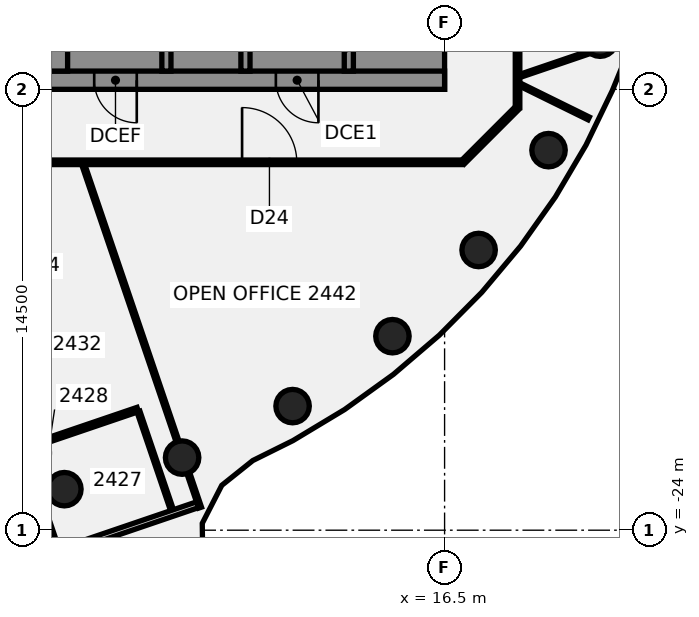
"""IFC4 building model, lengths in metres.
Left out: names, types, materials, properties, quantities, classifications, styles, units other than length and angle.
Written with IfcOpenShell. Run it as: python <this file> out.ifc"""

import sys

from ifc_helpers import new_model, si_unit, direction, frame, frame_2d, origin, origin_2d, place, context, subcontext, project, spatial, polyline, rectangle, circle, outline, extrude, element, fill, save


model = new_model("IFC4")
c1 = context("Model", 3, precision=1e-05, world=origin(), true_north=direction((0.0, 1.0)))
c2 = subcontext(c1, "Body", "Model", "MODEL_VIEW")
j1 = project(units=[si_unit("LENGTHUNIT", "METRE"), si_unit("PLANEANGLEUNIT", "RADIAN")], contexts=[c1])
p1 = place(None, origin())
s1 = spatial("IfcSite", under=j1, at=p1, CompositionType="ELEMENT")
p2 = place(p1, origin())
s2 = spatial("IfcBuilding", under=s1, at=p2, CompositionType="ELEMENT")
p3 = place(p2, frame((0.0, 0.0, 102.25)))
s3 = spatial("IfcBuildingStorey", under=s2, at=p3, CompositionType="ELEMENT", Elevation=102.25)
for number, where, z_axis, x_axis in (
    (1, (3.994, -22.651, -0.14), (0.0, 0.0, 1.0), (1.0, 0.0, 0.0)),
    (2, (7.866, -21.613, -0.14), (0.0, 0.0, 1.0), (1.0, 0.0, 0.0)),
    (3, (11.5, -19.919, -0.14), (0.0, 0.0, 1.0), (1.0, 0.0, 0.0)),
    (4, (14.784, -17.619, -0.14), (0.0, 0.0, 1.0), (1.0, 0.0, 0.0)),
    (5, (17.619, -14.784, -0.14), (0.0, 0.0, 1.0), (1.0, 0.0, 0.0)),
    (6, (19.919, -11.5, -0.14), (0.0, 0.0, 1.0), (1.0, 0.0, 0.0)),
    (7, (21.613, -7.866, -0.14), (0.0, 0.0, 1.0), (1.0, 0.0, 0.0)),
):
    element("IfcColumn", number, at=place(p3, frame(where, z_axis=z_axis, x_axis=x_axis)), inside=s3, PredefinedType="COLUMN", context=c2, shape_type="SweptSolid", body=[
        extrude(circle(Radius=0.55, at=origin_2d()), origin(), (0.0, 0.0, 1.0), 3.75),
    ])
p4 = place(p3, frame((1.594, -22.957, 0.0), z_axis=(0.0, 0.0, 1.0), x_axis=(0.322459995199, -0.946583092759, 0.0)))
e8 = element("IfcWall", 8, at=p4, inside=s3, PredefinedType="PARTITIONING", context=c2, shape_type="SweptSolid", body=[
    extrude(rectangle(XDim=15.801, YDim=0.15, at=frame_2d((7.9, 0.0))), origin(), (0.0, 0.0, 1.0), 3.01),
])
p5 = place(p4, frame((0.58, 0.0, 0.0)))
e9 = element("IfcOpeningElement", 9, at=p5, cuts=e8, PredefinedType="OPENING", context=c2, shape_type="SweptSolid", body=[
    extrude(rectangle(XDim=1.0, YDim=2.1, at=frame_2d((0.5, 1.05))), frame((0.0, 0.085, 0.0), z_axis=(0.0, -1.0, 0.0), x_axis=(1.0, 0.0, 0.0)), (0.0, 0.0, 1.0), 0.17),
])
p6 = place(p4, frame((12.131, 0.0, 0.0)))
e10 = element("IfcOpeningElement", 10, at=p6, cuts=e8, PredefinedType="OPENING", context=c2, shape_type="SweptSolid", body=[
    extrude(rectangle(XDim=0.9, YDim=2.1, at=frame_2d((0.45, 1.05))), frame((0.0, 0.085, 0.0), z_axis=(0.0, -1.0, 0.0), x_axis=(1.0, 0.0, 0.0)), (0.0, 0.0, 1.0), 0.17),
])
p7 = place(p4, frame((3.28, 0.0, 0.0)))
e11 = element("IfcOpeningElement", 11, at=p7, cuts=e8, PredefinedType="OPENING", context=c2, shape_type="SweptSolid", body=[
    extrude(rectangle(XDim=1.8, YDim=2.1, at=frame_2d((0.9, 1.05))), frame((0.0, 0.085, 0.0), z_axis=(0.0, -1.0, 0.0), x_axis=(1.0, 0.0, 0.0)), (0.0, 0.0, 1.0), 0.17),
])
p8 = place(p3, frame((2.646, -21.395, 0.0), z_axis=(0.0, 0.0, 1.0), x_axis=(0.322461421238, -0.946582606967, 0.0)))
e12 = element("IfcWall", 12, at=p8, inside=s3, PredefinedType="PARTITIONING", context=c2, shape_type="SweptSolid", body=[
    extrude(rectangle(XDim=3.415, YDim=0.15, at=frame_2d((1.708, 0.0))), origin(), (0.0, 0.0, 1.0), 3.01),
])
p9 = place(p8, frame((0.07, 0.0, 0.0)))
e13 = element("IfcOpeningElement", 13, at=p9, cuts=e12, PredefinedType="OPENING", context=c2, shape_type="SweptSolid", body=[
    extrude(rectangle(XDim=0.9, YDim=2.1, at=frame_2d((0.45, 1.05))), frame((0.0, 0.085, 0.0), z_axis=(0.0, -1.0, 0.0), x_axis=(1.0, 0.0, 0.0)), (0.0, 0.0, 1.0), 0.17),
])
p10 = place(p3, frame((4.615, -11.976, 0.0), z_axis=(0.0, 0.0, 1.0), x_axis=(0.322350798931, -0.946620284184, 0.0)))
e14 = element("IfcWall", 14, at=p10, inside=s3, PredefinedType="PARTITIONING", context=c2, shape_type="SweptSolid", body=[
    extrude(rectangle(XDim=9.631, YDim=0.1, at=frame_2d((4.815, 0.0))), origin(), (0.0, 0.0, 1.0), 3.01),
])
p11 = place(p3, frame((8.069, -22.119, 0.0), z_axis=(0.0, 0.0, 1.0), x_axis=(0.322430157515, -0.946593256644, 0.0)))
e15 = element("IfcWall", 15, at=p11, inside=s3, PredefinedType="PARTITIONING", context=c2, shape_type="SweptSolid", body=[
    extrude(rectangle(XDim=1.203, YDim=0.1, at=frame_2d((0.602, 0.0))), origin(), (0.0, 0.0, 1.0), 3.01),
])
p12 = place(p3, frame((6.431, -20.1, 0.0), z_axis=(0.0, 0.0, 1.0), x_axis=(0.322273311912, -0.946646667152, 0.0)))
e16 = element("IfcWall", 16, at=p12, inside=s3, PredefinedType="PARTITIONING", context=c2, shape_type="SweptSolid", body=[
    extrude(rectangle(XDim=3.425, YDim=0.1, at=frame_2d((1.712, 0.0))), origin(), (0.0, 0.0, 1.0), 3.01),
])
p13 = place(p3, frame((18.978, -9.343, 0.0), z_axis=(0.0, 0.0, 1.0), x_axis=(0.897216700268, -0.441590526122, 0.0)))
e17 = element("IfcWall", 17, at=p13, inside=s3, PredefinedType="PARTITIONING", context=c2, shape_type="SweptSolid", body=[
    extrude(rectangle(XDim=2.522, YDim=0.1, at=frame_2d((1.261, 0.0))), origin(), (0.0, 0.0, 1.0), 3.01),
])
p14 = place(p3, frame((-17.1, -11.9, 0.0), z_axis=(0.0, 0.0, 1.0), x_axis=(1.0, 0.0, 0.0)))
e18 = element("IfcWall", 18, at=p14, inside=s3, PredefinedType="PARTITIONING", context=c2, shape_type="SweptSolid", body=[
    extrude(rectangle(XDim=34.165, YDim=0.15, at=frame_2d((17.083, 0.0))), origin(), (0.0, 0.0, 1.0), 3.01),
])
p15 = place(p14, frame((12.769, 0.0, 0.0)))
e19 = element("IfcOpeningElement", 19, at=p15, cuts=e18, PredefinedType="OPENING", context=c2, shape_type="SweptSolid", body=[
    extrude(rectangle(XDim=1.8, YDim=2.1, at=frame_2d((0.9, 1.05))), frame((0.0, 0.085, 0.0), z_axis=(0.0, -1.0, 0.0), x_axis=(1.0, 0.0, 0.0)), (0.0, 0.0, 1.0), 0.17),
])
p16 = place(p14, frame((2.55, 0.0, 0.0)))
e20 = element("IfcOpeningElement", 20, at=p16, cuts=e18, PredefinedType="OPENING", context=c2, shape_type="SweptSolid", body=[
    extrude(rectangle(XDim=1.8, YDim=2.1, at=frame_2d((0.9, 1.05))), frame((0.0, 0.085, 0.0), z_axis=(0.0, -1.0, 0.0), x_axis=(1.0, 0.0, 0.0)), (0.0, 0.0, 1.0), 0.17),
])
p17 = place(p14, frame((26.939, 0.0, 0.0)))
e21 = element("IfcOpeningElement", 21, at=p17, cuts=e18, PredefinedType="OPENING", context=c2, shape_type="SweptSolid", body=[
    extrude(rectangle(XDim=1.8, YDim=2.1, at=frame_2d((0.9, 1.05))), frame((0.0, 0.085, 0.0), z_axis=(0.0, -1.0, 0.0), x_axis=(1.0, 0.0, 0.0)), (0.0, 0.0, 1.0), 0.17),
])
p18 = place(p3, frame((2.62, -21.32, 0.0), z_axis=(0.0, 0.0, 1.0), x_axis=(0.946650302142, 0.322262634282, 0.0)))
e22 = element("IfcWall", 22, at=p18, inside=s3, PredefinedType="PARTITIONING", context=c2, shape_type="SweptSolid", body=[
    extrude(rectangle(XDim=4.001, YDim=0.15, at=frame_2d((2.0, 0.0))), origin(), (0.0, 0.0, 1.0), 3.01),
])
p19 = place(p3, frame((-5.116, -27.757, 0.0), z_axis=(0.0, 0.0, 1.0), x_axis=(0.946603630107, 0.32239970141, 0.0)))
e23 = element("IfcWall", 23, at=p19, inside=s3, PredefinedType="PARTITIONING", context=c2, shape_type="SweptSolid", body=[
    extrude(rectangle(XDim=14.249, YDim=0.2, at=frame_2d((7.124, 0.0))), origin(), (0.0, 0.0, 1.0), 3.01),
])
p20 = place(p19, frame((5.799, 0.0, 0.0)))
e24 = element("IfcOpeningElement", 24, at=p20, cuts=e23, PredefinedType="OPENING", context=c2, shape_type="SweptSolid", body=[
    extrude(rectangle(XDim=1.4, YDim=2.1, at=frame_2d((0.7, 1.05))), frame((0.0, 0.11, 0.0), z_axis=(0.0, -1.0, 0.0), x_axis=(1.0, 0.0, 0.0)), (0.0, 0.0, 1.0), 0.22),
])
p21 = place(p3, frame((18.976, -9.058, 0.0), z_axis=(0.0, 0.0, 1.0), x_axis=(0.946631529525, 0.322317773804, 0.0)))
e25 = element("IfcWall", 25, at=p21, inside=s3, PredefinedType="PARTITIONING", context=c2, shape_type="SweptSolid", body=[
    extrude(rectangle(XDim=2.415, YDim=0.1, at=frame_2d((1.208, 0.0))), origin(), (0.0, 0.0, 1.0), 3.01),
])
p22 = place(p3, frame((17.1, -11.9, 0.0), z_axis=(0.0, 0.0, 1.0), x_axis=(0.707106781187, 0.707106781187, 0.0)))
e26 = element("IfcWall", 26, at=p22, inside=s3, PredefinedType="PARTITIONING", context=c2, shape_type="SweptSolid", body=[
    extrude(rectangle(XDim=2.505, YDim=0.15, at=frame_2d((1.253, 0.0))), origin(), (0.0, 0.0, 1.0), 3.01),
])
p23 = place(p3, frame((18.9, -10.1, 0.0), z_axis=(0.0, 0.0, 1.0), x_axis=(0.0, 1.0, 0.0)))
e27 = element("IfcWall", 27, at=p23, inside=s3, PredefinedType="PARTITIONING", context=c2, shape_type="SweptSolid", body=[
    extrude(rectangle(XDim=20.2, YDim=0.15, at=frame_2d((10.1, 0.0))), origin(), (0.0, 0.0, 1.0), 3.01),
])
p24 = place(p23, frame((8.903, 0.0, 0.0)))
e28 = element("IfcOpeningElement", 28, at=p24, cuts=e27, PredefinedType="OPENING", context=c2, shape_type="SweptSolid", body=[
    extrude(rectangle(XDim=1.8, YDim=2.1, at=frame_2d((0.9, 1.05))), frame((0.0, 0.085, 0.0), z_axis=(0.0, -1.0, 0.0), x_axis=(1.0, 0.0, 0.0)), (0.0, 0.0, 1.0), 0.17),
])
p25 = place(p23, frame((13.836, 0.0, 0.0)))
e29 = element("IfcOpeningElement", 29, at=p25, cuts=e27, PredefinedType="OPENING", context=c2, shape_type="SweptSolid", body=[
    extrude(rectangle(XDim=0.9, YDim=2.1, at=frame_2d((0.45, 1.05))), frame((0.0, 0.085, 0.0), z_axis=(0.0, -1.0, 0.0), x_axis=(1.0, 0.0, 0.0)), (0.0, 0.0, 1.0), 0.17),
])
p26 = place(p3, frame((16.5, -9.2, 0.0), z_axis=(0.0, 0.0, 1.0), x_axis=(-1.0, 0.0, 0.0)))
e30 = element("IfcWall", 30, at=p26, inside=s3, PredefinedType="SHEAR", context=c2, shape_type="SweptSolid", body=[
    extrude(rectangle(XDim=13.0, YDim=0.6, at=frame_2d((6.5, 0.0))), origin(), (0.0, 0.0, 1.0), 3.61),
])
p27 = place(p26, frame((4.15, 0.0, 0.0)))
e31 = element("IfcOpeningElement", 31, at=p27, cuts=e30, PredefinedType="OPENING", context=c2, shape_type="SweptSolid", body=[
    extrude(rectangle(XDim=1.4, YDim=2.1, at=frame_2d((0.7, 1.05))), frame((0.0, 0.31, 0.0), z_axis=(0.0, -1.0, 0.0), x_axis=(1.0, 0.0, 0.0)), (0.0, 0.0, 1.0), 0.62),
])
p28 = place(p26, frame((10.125, 0.0, 0.0)))
e32 = element("IfcOpeningElement", 32, at=p28, cuts=e30, PredefinedType="OPENING", context=c2, shape_type="SweptSolid", body=[
    extrude(rectangle(XDim=1.4, YDim=2.1, at=frame_2d((0.7, 1.05))), frame((0.0, 0.31, 0.0), z_axis=(0.0, -1.0, 0.0), x_axis=(1.0, 0.0, 0.0)), (0.0, 0.0, 1.0), 0.62),
])
p29 = place(p3, origin())
e33 = element("IfcWall", 33, at=p29, inside=s3, PredefinedType="SHEAR", context=c2, shape_type="SweptSolid", body=[
    extrude(outline(polyline([(13.5, -8.9), (15.9, -8.9), (16.5, -8.9), (16.5, 8.9), (15.9, 8.9), (13.5, 8.9), (13.5, 8.125), (15.9, 8.125), (15.9, 5.625), (13.5, 5.625), (13.5, 5.375), (15.9, 5.375), (15.9, 2.875), (13.5, 2.875), (13.5, 2.625), (15.9, 2.625), (15.9, 0.125), (13.5, 0.125), (13.5, -0.125), (15.9, -0.125), (15.9, -2.625), (13.5, -2.625), (13.5, -2.875), (15.9, -2.875), (15.9, -5.375), (13.5, -5.375), (13.5, -5.625), (15.9, -5.625), (15.9, -8.125), (13.5, -8.125), (13.5, -8.9)])), origin(), (0.0, 0.0, 1.0), 3.61),
])
p30 = place(p3, origin())
e34 = element("IfcWall", 34, at=p30, inside=s3, PredefinedType="SHEAR", context=c2, shape_type="SweptSolid", body=[
    extrude(outline(polyline([(7.5, -8.125), (7.5, -8.9), (9.8, -8.9), (9.8, -8.125), (9.8, -5.625), (9.55, -5.625), (9.55, -8.125), (7.5, -8.125)])), origin(), (0.0, 0.0, 1.0), 3.61),
])
p31 = place(p3, frame((7.35, -8.9, 0.0), z_axis=(0.0, 0.0, 1.0), x_axis=(0.0, 1.0, 0.0)))
e35 = element("IfcWall", 35, at=p31, inside=s3, PredefinedType="SHEAR", context=c2, shape_type="SweptSolid", body=[
    extrude(rectangle(XDim=0.775, YDim=0.3, at=frame_2d((0.387, 0.0))), origin(), (0.0, 0.0, 1.0), 3.61),
])
p32 = place(p3, frame((13.35, -8.9, 0.0), z_axis=(0.0, 0.0, 1.0), x_axis=(0.0, 1.0, 0.0)))
e36 = element("IfcWall", 36, at=p32, inside=s3, PredefinedType="SHEAR", context=c2, shape_type="SweptSolid", body=[
    extrude(rectangle(XDim=17.8, YDim=0.3, at=frame_2d((8.9, 0.0))), origin(), (0.0, 0.0, 1.0), 3.61),
])
p33 = place(p32, frame((1.325, 0.0, 0.0)))
e37 = element("IfcOpeningElement", 37, at=p33, cuts=e36, PredefinedType="OPENING", context=c2, shape_type="SweptSolid", body=[
    extrude(rectangle(XDim=1.4, YDim=2.1, at=frame_2d((0.7, 1.05))), frame((0.0, 0.16, 0.0), z_axis=(0.0, -1.0, 0.0), x_axis=(1.0, 0.0, 0.0)), (0.0, 0.0, 1.0), 0.32),
])
p34 = place(p32, frame((4.225, 0.0, 0.0)))
e38 = element("IfcOpeningElement", 38, at=p34, cuts=e36, PredefinedType="OPENING", context=c2, shape_type="SweptSolid", body=[
    extrude(rectangle(XDim=1.1, YDim=2.1, at=frame_2d((0.55, 1.05))), frame((0.0, 0.16, 0.0), z_axis=(0.0, -1.0, 0.0), x_axis=(1.0, 0.0, 0.0)), (0.0, 0.0, 1.0), 0.32),
])
p35 = place(p32, frame((6.975, 0.0, 0.0)))
e39 = element("IfcOpeningElement", 39, at=p35, cuts=e36, PredefinedType="OPENING", context=c2, shape_type="SweptSolid", body=[
    extrude(rectangle(XDim=1.1, YDim=2.1, at=frame_2d((0.55, 1.05))), frame((0.0, 0.16, 0.0), z_axis=(0.0, -1.0, 0.0), x_axis=(1.0, 0.0, 0.0)), (0.0, 0.0, 1.0), 0.32),
])
p36 = place(p32, frame((9.725, 0.0, 0.0)))
e40 = element("IfcOpeningElement", 40, at=p36, cuts=e36, PredefinedType="OPENING", context=c2, shape_type="SweptSolid", body=[
    extrude(rectangle(XDim=1.1, YDim=2.1, at=frame_2d((0.55, 1.05))), frame((0.0, 0.16, 0.0), z_axis=(0.0, -1.0, 0.0), x_axis=(1.0, 0.0, 0.0)), (0.0, 0.0, 1.0), 0.32),
])
p37 = place(p32, frame((12.475, 0.0, 0.0)))
e41 = element("IfcOpeningElement", 41, at=p37, cuts=e36, PredefinedType="OPENING", context=c2, shape_type="SweptSolid", body=[
    extrude(rectangle(XDim=1.1, YDim=2.1, at=frame_2d((0.55, 1.05))), frame((0.0, 0.16, 0.0), z_axis=(0.0, -1.0, 0.0), x_axis=(1.0, 0.0, 0.0)), (0.0, 0.0, 1.0), 0.32),
])
p38 = place(p3, frame((9.95, -8.9, 0.0), z_axis=(0.0, 0.0, 1.0), x_axis=(0.0, 1.0, 0.0)))
e42 = element("IfcWall", 42, at=p38, inside=s3, PredefinedType="SHEAR", context=c2, shape_type="SweptSolid", body=[
    extrude(rectangle(XDim=17.8, YDim=0.3, at=frame_2d((8.9, 0.0))), origin(), (0.0, 0.0, 1.0), 3.61),
])
p39 = place(p3, frame((3.8, -8.9, 0.0), z_axis=(0.0, 0.0, 1.0), x_axis=(0.0, 1.0, 0.0)))
e43 = element("IfcWall", 43, at=p39, inside=s3, PredefinedType="SHEAR", context=c2, shape_type="SweptSolid", body=[
    extrude(rectangle(XDim=17.8, YDim=0.6, at=frame_2d((8.9, 0.0))), origin(), (0.0, 0.0, 1.0), 3.61),
])
p40 = place(p39, frame((1.25, 0.0, 0.0)))
e44 = element("IfcOpeningElement", 44, at=p40, cuts=e43, PredefinedType="OPENING", context=c2, shape_type="SweptSolid", body=[
    extrude(rectangle(XDim=1.8, YDim=2.1, at=frame_2d((0.9, 1.05))), frame((0.0, 0.31, 0.0), z_axis=(0.0, -1.0, 0.0), x_axis=(1.0, 0.0, 0.0)), (0.0, 0.0, 1.0), 0.62),
])
p41 = place(p39, frame((13.8, 0.0, 0.0)))
e45 = element("IfcOpeningElement", 45, at=p41, cuts=e43, PredefinedType="OPENING", context=c2, shape_type="SweptSolid", body=[
    extrude(rectangle(XDim=1.0, YDim=2.1, at=frame_2d((0.5, 1.05))), frame((0.0, 0.31, 0.0), z_axis=(0.0, -1.0, 0.0), x_axis=(1.0, 0.0, 0.0)), (0.0, 0.0, 1.0), 0.62),
])
p42 = place(p17, frame((1.8, 0.0, 0.0), z_axis=(0.0, 0.0, 1.0), x_axis=(-1.0, 0.0, 0.0)))
e46 = element("IfcDoor", 46, at=p42, inside=s3, OperationType="DOUBLE_DOOR_SINGLE_SWING", PredefinedType="DOOR", context=c2, shape_type="SweptSolid", body=[
    extrude(rectangle(XDim=1.8, YDim=2.1, at=frame_2d((0.9, 1.05))), frame((0.0, 0.025, 0.0), z_axis=(0.0, -1.0, 0.0), x_axis=(1.0, 0.0, 0.0)), (0.0, 0.0, 1.0), 0.05),
])
fill(e21, e46)
p43 = place(p27, origin())
e47 = element("IfcDoor", 47, at=p43, inside=s3, OperationType="SINGLE_SWING_LEFT", PredefinedType="DOOR", context=c2, shape_type="SweptSolid", body=[
    extrude(rectangle(XDim=1.4, YDim=2.1, at=frame_2d((0.7, 1.05))), frame((0.0, 0.025, 0.0), z_axis=(0.0, -1.0, 0.0), x_axis=(1.0, 0.0, 0.0)), (0.0, 0.0, 1.0), 0.05),
])
fill(e31, e47)
p44 = place(p28, origin())
e48 = element("IfcDoor", 48, at=p44, inside=s3, OperationType="SINGLE_SWING_LEFT", PredefinedType="DOOR", context=c2, shape_type="SweptSolid", body=[
    extrude(rectangle(XDim=1.4, YDim=2.1, at=frame_2d((0.7, 1.05))), frame((0.0, 0.025, 0.0), z_axis=(0.0, -1.0, 0.0), x_axis=(1.0, 0.0, 0.0)), (0.0, 0.0, 1.0), 0.05),
])
fill(e32, e48)
save(model, sys.argv[1])
